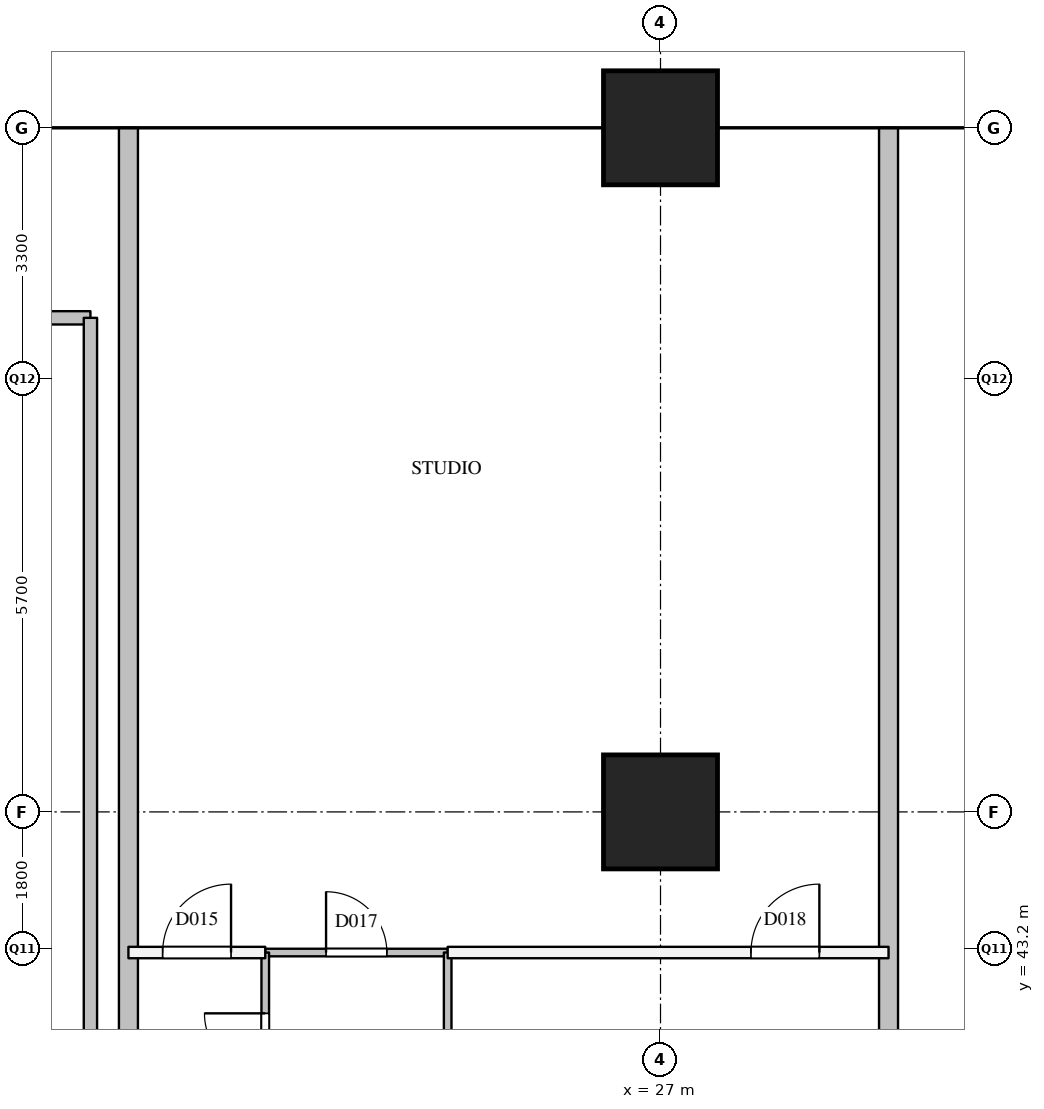
"""IFC4 building model, lengths in metres.
Left out: names, types, materials, properties, quantities, classifications, styles, units other than length and angle.
Written with IfcOpenShell. Run it as: python <this file> out.ifc"""

import sys

from ifc_helpers import new_model, si_unit, direction, frame, frame_2d, origin, origin_2d, place, context, subcontext, project, spatial, rectangle, extrude, element, fill, save


model = new_model("IFC4")
c1 = context("Model", 3, precision=1e-05, world=origin(), true_north=direction((0.0, 1.0)))
c2 = subcontext(c1, "Body", "Model", "MODEL_VIEW")
j1 = project(units=[si_unit("LENGTHUNIT", "METRE"), si_unit("PLANEANGLEUNIT", "RADIAN")], contexts=[c1])
p1 = place(None, origin())
s1 = spatial("IfcSite", under=j1, at=p1, CompositionType="ELEMENT")
p2 = place(p1, origin())
s2 = spatial("IfcBuilding", under=s1, at=p2, CompositionType="ELEMENT")
p3 = place(p2, frame((0.0, 0.0, 142.7)))
s3 = spatial("IfcBuildingStorey", under=s2, at=p3, CompositionType="ELEMENT", Elevation=142.7)
for number, where, z_axis, x_axis in (
    (1, (27.0, 45.0, 0.0), (0.0, 0.0, 1.0), (1.0, 0.0, 0.0)),
    (2, (27.0, 54.0, 0.0), (0.0, 0.0, 1.0), (1.0, 0.0, 0.0)),
):
    element("IfcColumn", number, at=place(p3, frame(where, z_axis=z_axis, x_axis=x_axis)), inside=s3, PredefinedType="COLUMN", context=c2, shape_type="SweptSolid", body=[
        extrude(rectangle(XDim=1.5, YDim=1.5, at=origin_2d()), origin(), (0.0, 0.0, 1.0), 3.9),
    ])
p4 = place(p3, frame((4.1, 51.5, 0.0), z_axis=(0.0, 0.0, 1.0), x_axis=(1.0, 0.0, 0.0)))
e3 = element("IfcWall", 3, at=p4, inside=s3, PredefinedType="PARTITIONING", context=c2, shape_type="SweptSolid", body=[
    extrude(rectangle(XDim=15.4, YDim=0.175, at=frame_2d((7.7, 0.0))), origin(), (0.0, 0.0, 1.0), 3.6),
])
p5 = place(p4, frame((8.327, 0.0, 0.0)))
e4 = element("IfcOpeningElement", 4, at=p5, cuts=e3, PredefinedType="OPENING", context=c2, shape_type="SweptSolid", body=[
    extrude(rectangle(XDim=0.9, YDim=2.1, at=frame_2d((0.45, 1.05))), frame((0.0, 0.097, 0.0), z_axis=(0.0, -1.0, 0.0), x_axis=(1.0, 0.0, 0.0)), (0.0, 0.0, 1.0), 0.195),
])
p6 = place(p3, frame((19.5, 40.75, 0.0), z_axis=(0.0, 0.0, 1.0), x_axis=(0.0, 1.0, 0.0)))
e5 = element("IfcWall", 5, at=p6, inside=s3, PredefinedType="PARTITIONING", context=c2, shape_type="SweptSolid", body=[
    extrude(rectangle(XDim=10.75, YDim=0.175, at=frame_2d((5.375, 0.0))), origin(), (0.0, 0.0, 1.0), 3.6),
])
p7 = place(p3, frame((20.0, 43.15, 0.0), z_axis=(0.0, 0.0, 1.0), x_axis=(1.0, 0.0, 0.0)))
e6 = element("IfcWall", 6, at=p7, inside=s3, PredefinedType="PARTITIONING", context=c2, shape_type="SweptSolid", body=[
    extrude(rectangle(XDim=1.8, YDim=0.15, at=frame_2d((0.9, 0.0))), origin(), (0.0, 0.0, 1.0), 3.6),
])
p8 = place(p7, frame((0.45, 0.0, 0.0)))
e7 = element("IfcOpeningElement", 7, at=p8, cuts=e6, PredefinedType="OPENING", context=c2, shape_type="SweptSolid", body=[
    extrude(rectangle(XDim=0.9, YDim=2.1, at=frame_2d((0.45, 1.05))), frame((0.0, 0.085, 0.0), z_axis=(0.0, -1.0, 0.0), x_axis=(1.0, 0.0, 0.0)), (0.0, 0.0, 1.0), 0.17),
])
p9 = place(p3, frame((24.2, 43.15, 0.0), z_axis=(0.0, 0.0, 1.0), x_axis=(1.0, 0.0, 0.0)))
e8 = element("IfcWall", 8, at=p9, inside=s3, PredefinedType="PARTITIONING", context=c2, shape_type="SweptSolid", body=[
    extrude(rectangle(XDim=5.8, YDim=0.15, at=frame_2d((2.9, 0.0))), origin(), (0.0, 0.0, 1.0), 2.6),
])
p10 = place(p9, frame((3.99, 0.0, 0.0)))
e9 = element("IfcOpeningElement", 9, at=p10, cuts=e8, PredefinedType="OPENING", context=c2, shape_type="SweptSolid", body=[
    extrude(rectangle(XDim=0.9, YDim=2.1, at=frame_2d((0.45, 1.05))), frame((0.0, 0.085, 0.0), z_axis=(0.0, -1.0, 0.0), x_axis=(1.0, 0.0, 0.0)), (0.0, 0.0, 1.0), 0.17),
])
for number, where, z_axis, x_axis in (
    (10, (20.0, 40.75, 0.0), (0.0, 0.0, 1.0), (0.0, 1.0, 0.0)),
    (11, (30.0, 40.75, 0.0), (0.0, 0.0, 1.0), (0.0, 1.0, 0.0)),
):
    element("IfcWall", number, at=place(p3, frame(where, z_axis=z_axis, x_axis=x_axis)), inside=s3, PredefinedType="PARTITIONING", context=c2, shape_type="SweptSolid", body=[
        extrude(rectangle(XDim=13.25, YDim=0.25, at=frame_2d((6.625, 0.0))), origin(), (0.0, 0.0, 1.0), 2.6),
    ])
p11 = place(p3, frame((21.8, 43.15, 0.0), z_axis=(0.0, 0.0, 1.0), x_axis=(1.0, 0.0, 0.0)))
e12 = element("IfcWall", 12, at=p11, inside=s3, PredefinedType="PARTITIONING", context=c2, shape_type="SweptSolid", body=[
    extrude(rectangle(XDim=2.4, YDim=0.1, at=frame_2d((1.2, 0.0))), origin(), (0.0, 0.0, 1.0), 3.6),
])
p12 = place(p11, frame((0.8, 0.0, 0.0)))
e13 = element("IfcOpeningElement", 13, at=p12, cuts=e12, PredefinedType="OPENING", context=c2, shape_type="SweptSolid", body=[
    extrude(rectangle(XDim=0.8, YDim=2.1, at=frame_2d((0.4, 1.05))), frame((0.0, 0.06, 0.0), z_axis=(0.0, -1.0, 0.0), x_axis=(1.0, 0.0, 0.0)), (0.0, 0.0, 1.0), 0.12),
])
p13 = place(p3, frame((21.8, 40.75, 0.0), z_axis=(0.0, 0.0, 1.0), x_axis=(0.0, 1.0, 0.0)))
e14 = element("IfcWall", 14, at=p13, inside=s3, PredefinedType="PARTITIONING", context=c2, shape_type="SweptSolid", body=[
    extrude(rectangle(XDim=2.4, YDim=0.1, at=frame_2d((1.2, 0.0))), origin(), (0.0, 0.0, 1.0), 3.6),
])
p14 = place(p13, frame((0.8, 0.0, 0.0)))
e15 = element("IfcOpeningElement", 15, at=p14, cuts=e14, PredefinedType="OPENING", context=c2, shape_type="SweptSolid", body=[
    extrude(rectangle(XDim=0.8, YDim=2.1, at=frame_2d((0.4, 1.05))), frame((0.0, 0.06, 0.0), z_axis=(0.0, -1.0, 0.0), x_axis=(1.0, 0.0, 0.0)), (0.0, 0.0, 1.0), 0.12),
])
p15 = place(p3, frame((24.2, 40.75, 0.0), z_axis=(0.0, 0.0, 1.0), x_axis=(0.0, 1.0, 0.0)))
e16 = element("IfcWall", 16, at=p15, inside=s3, PredefinedType="PARTITIONING", context=c2, shape_type="SweptSolid", body=[
    extrude(rectangle(XDim=2.4, YDim=0.1, at=frame_2d((1.2, 0.0))), origin(), (0.0, 0.0, 1.0), 3.6),
])
p16 = place(p8, origin())
e17 = element("IfcDoor", 17, at=p16, inside=s3, OperationType="SINGLE_SWING_RIGHT", PredefinedType="DOOR", context=c2, shape_type="SweptSolid", body=[
    extrude(rectangle(XDim=0.9, YDim=2.1, at=frame_2d((0.45, 1.05))), frame((0.0, 0.025, 0.0), z_axis=(0.0, -1.0, 0.0), x_axis=(1.0, 0.0, 0.0)), (0.0, 0.0, 1.0), 0.05),
])
fill(e7, e17)
p17 = place(p14, origin())
e18 = element("IfcDoor", 18, at=p17, inside=s3, OperationType="SINGLE_SWING_RIGHT", PredefinedType="DOOR", context=c2, shape_type="SweptSolid", body=[
    extrude(rectangle(XDim=0.8, YDim=2.1, at=frame_2d((0.4, 1.05))), frame((0.0, 0.025, 0.0), z_axis=(0.0, -1.0, 0.0), x_axis=(1.0, 0.0, 0.0)), (0.0, 0.0, 1.0), 0.05),
])
fill(e15, e18)
p18 = place(p12, origin())
e19 = element("IfcDoor", 19, at=p18, inside=s3, OperationType="SINGLE_SWING_LEFT", PredefinedType="DOOR", context=c2, shape_type="SweptSolid", body=[
    extrude(rectangle(XDim=0.8, YDim=2.1, at=frame_2d((0.4, 1.05))), frame((0.0, 0.025, 0.0), z_axis=(0.0, -1.0, 0.0), x_axis=(1.0, 0.0, 0.0)), (0.0, 0.0, 1.0), 0.05),
])
fill(e13, e19)
p19 = place(p10, origin())
e20 = element("IfcDoor", 20, at=p19, inside=s3, OperationType="SINGLE_SWING_RIGHT", PredefinedType="DOOR", context=c2, shape_type="SweptSolid", body=[
    extrude(rectangle(XDim=0.9, YDim=2.1, at=frame_2d((0.45, 1.05))), frame((0.0, 0.025, 0.0), z_axis=(0.0, -1.0, 0.0), x_axis=(1.0, 0.0, 0.0)), (0.0, 0.0, 1.0), 0.05),
])
fill(e9, e20)
save(model, sys.argv[1])
